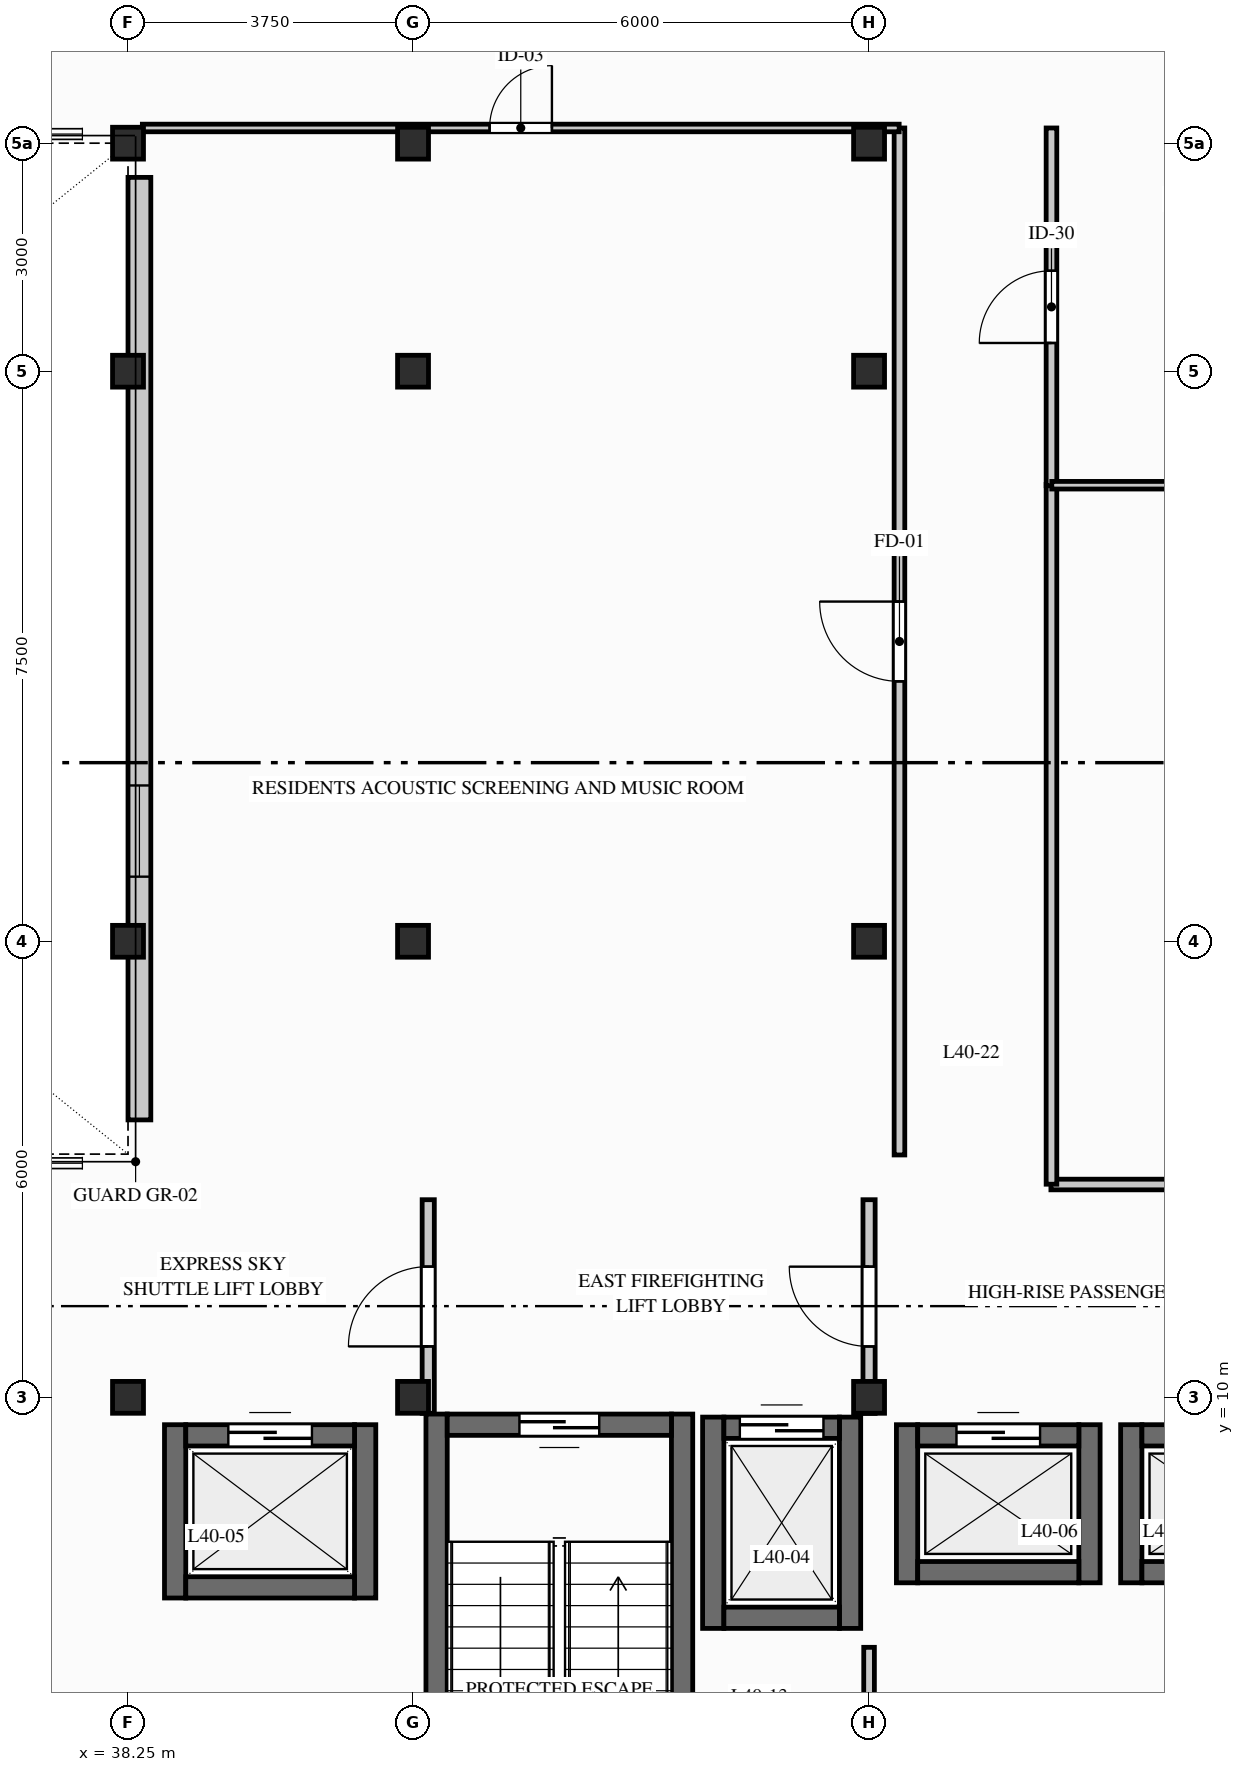
"""IFC4 building model, lengths in metres.
Left out: names, types, materials, properties, quantities, classifications, styles, units other than length and angle.
Written with IfcOpenShell. Run it as: python <this file> out.ifc"""

import sys

from ifc_helpers import new_model, si_unit, direction, frame, frame_2d, origin, origin_2d, place, context, subcontext, project, spatial, rectangle, i_section, extrude, element, fill, save


model = new_model("IFC4")
c1 = context("Model", 3, precision=1e-05, world=origin(), true_north=direction((0.0, 1.0)))
c2 = subcontext(c1, "Body", "Model", "MODEL_VIEW")
j1 = project(units=[si_unit("LENGTHUNIT", "METRE"), si_unit("PLANEANGLEUNIT", "RADIAN")], contexts=[c1])
p1 = place(None, origin())
s1 = spatial("IfcSite", under=j1, at=p1, CompositionType="ELEMENT")
p2 = place(p1, origin())
s2 = spatial("IfcBuilding", under=s1, at=p2, CompositionType="ELEMENT")
p3 = place(p2, frame((0.0, 0.0, 134.5)))
s3 = spatial("IfcBuildingStorey", under=s2, at=p3, CompositionType="ELEMENT", Elevation=134.5)
for number, where, z_axis, x_axis in (
    (1, (38.25, 10.0, 0.0), (0.0, 0.0, 1.0), (1.0, 0.0, 0.0)),
    (2, (38.25, 16.0, 0.0), (0.0, 0.0, 1.0), (1.0, 0.0, 0.0)),
    (3, (38.25, 23.5, 0.0), (0.0, 0.0, 1.0), (1.0, 0.0, 0.0)),
    (4, (38.25, 26.5, 0.0), (0.0, 0.0, 1.0), (1.0, 0.0, 0.0)),
    (5, (42.0, 10.0, 0.0), (0.0, 0.0, 1.0), (1.0, 0.0, 0.0)),
    (6, (42.0, 16.0, 0.0), (0.0, 0.0, 1.0), (1.0, 0.0, 0.0)),
    (7, (42.0, 23.5, 0.0), (0.0, 0.0, 1.0), (1.0, 0.0, 0.0)),
    (8, (42.0, 26.5, 0.0), (0.0, 0.0, 1.0), (1.0, 0.0, 0.0)),
    (9, (48.0, 10.0, 0.0), (0.0, 0.0, 1.0), (1.0, 0.0, 0.0)),
    (10, (48.0, 16.0, 0.0), (0.0, 0.0, 1.0), (1.0, 0.0, 0.0)),
    (11, (48.0, 23.5, 0.0), (0.0, 0.0, 1.0), (1.0, 0.0, 0.0)),
    (12, (48.0, 26.5, 0.0), (0.0, 0.0, 1.0), (1.0, 0.0, 0.0)),
):
    element("IfcColumn", number, at=place(p3, frame(where, z_axis=z_axis, x_axis=x_axis)), inside=s3, PredefinedType="COLUMN", context=c2, shape_type="SweptSolid", body=[
        extrude(i_section(OverallWidth=0.407, OverallDepth=0.419, WebThickness=0.031, FlangeThickness=0.049, FilletRadius=0.015, at=origin_2d()), origin(), (0.0, 0.0, 1.0), 4.2),
    ])
p4 = place(p3, frame((38.4, 13.65, 0.0), z_axis=(0.0, 0.0, 1.0), x_axis=(0.0, 1.0, 0.0)))
e13 = element("IfcWall", 13, at=p4, inside=s3, PredefinedType="STANDARD", context=c2, shape_type="SweptSolid", body=[
    extrude(rectangle(XDim=12.4, YDim=0.3, at=frame_2d((6.2, 0.0))), origin(), (0.0, 0.0, 1.0), 3.343),
])
p5 = place(p4, frame((3.2, 0.0, 0.5)))
e14 = element("IfcOpeningElement", 14, at=p5, cuts=e13, PredefinedType="OPENING", context=c2, shape_type="SweptSolid", body=[
    extrude(rectangle(XDim=1.2, YDim=1.6, at=frame_2d((0.6, 0.8))), frame((0.0, 0.16, 0.0), z_axis=(0.0, -1.0, 0.0), x_axis=(1.0, 0.0, 0.0)), (0.0, 0.0, 1.0), 0.32),
])
for number, where, z_axis, x_axis in (
    (15, (42.31, 2.5, 0.0), (0.0, 0.0, 1.0), (0.0, 1.0, 0.0)),
    (16, (45.54, 2.5, 0.0), (0.0, 0.0, 1.0), (0.0, 1.0, 0.0)),
):
    element("IfcWall", number, at=place(p3, frame(where, z_axis=z_axis, x_axis=x_axis)), inside=s3, PredefinedType="SHEAR", context=c2, shape_type="SweptSolid", body=[
        extrude(rectangle(XDim=7.28, YDim=0.28, at=frame_2d((3.64, 0.0))), origin(), (0.0, 0.0, 1.0), 3.98),
    ])
p6 = place(p3, frame((45.4, 9.64, 0.0), z_axis=(0.0, 0.0, 1.0), x_axis=(-1.0, 0.0, 0.0)))
e17 = element("IfcWall", 17, at=p6, inside=s3, PredefinedType="SHEAR", context=c2, shape_type="SweptSolid", body=[
    extrude(rectangle(XDim=2.95, YDim=0.28, at=frame_2d((1.475, 0.0))), origin(), (0.0, 0.0, 1.0), 3.98),
])
p7 = place(p6, frame((0.95, 0.0, 0.0)))
e18 = element("IfcOpeningElement", 18, at=p7, cuts=e17, PredefinedType="OPENING", context=c2, shape_type="SweptSolid", body=[
    extrude(rectangle(XDim=1.05, YDim=2.06, at=frame_2d((0.525, 1.03))), frame((0.0, 0.15, 0.0), z_axis=(0.0, -1.0, 0.0), x_axis=(1.0, 0.0, 0.0)), (0.0, 0.0, 1.0), 0.3),
])
for number, where, z_axis, x_axis in (
    (19, (45.95, 6.96, 0.0), (0.0, 0.0, 1.0), (0.0, 1.0, 0.0)),
    (20, (47.75, 6.96, 0.0), (0.0, 0.0, 1.0), (0.0, 1.0, 0.0)),
):
    element("IfcWall", number, at=place(p3, frame(where, z_axis=z_axis, x_axis=x_axis)), inside=s3, PredefinedType="SHEAR", context=c2, shape_type="SweptSolid", body=[
        extrude(rectangle(XDim=2.78, YDim=0.28, at=frame_2d((1.39, 0.0))), origin(), (0.0, 0.0, 1.0), 3.98),
    ])
p8 = place(p3, frame((46.09, 7.1, 0.0), z_axis=(0.0, 0.0, 1.0), x_axis=(1.0, 0.0, 0.0)))
e21 = element("IfcWall", 21, at=p8, inside=s3, PredefinedType="SHEAR", context=c2, shape_type="SweptSolid", body=[
    extrude(rectangle(XDim=1.52, YDim=0.28, at=frame_2d((0.76, 0.0))), origin(), (0.0, 0.0, 1.0), 3.98),
])
p9 = place(p3, frame((46.09, 9.6, 0.0), z_axis=(0.0, 0.0, 1.0), x_axis=(1.0, 0.0, 0.0)))
e22 = element("IfcWall", 22, at=p9, inside=s3, PredefinedType="SHEAR", context=c2, shape_type="SweptSolid", body=[
    extrude(rectangle(XDim=1.52, YDim=0.28, at=frame_2d((0.76, 0.0))), origin(), (0.0, 0.0, 1.0), 3.98),
])
p10 = place(p9, frame((0.21, 0.0, 0.0)))
e23 = element("IfcOpeningElement", 23, at=p10, cuts=e22, PredefinedType="OPENING", context=c2, shape_type="SweptSolid", body=[
    extrude(rectangle(XDim=1.1, YDim=2.06, at=frame_2d((0.55, 1.03))), frame((0.0, 0.15, 0.0), z_axis=(0.0, -1.0, 0.0), x_axis=(1.0, 0.0, 0.0)), (0.0, 0.0, 1.0), 0.3),
])
for number, where, z_axis, x_axis in (
    (24, (38.87, 7.36, 0.0), (0.0, 0.0, 1.0), (0.0, 1.0, 0.0)),
    (25, (41.37, 7.36, 0.0), (0.0, 0.0, 1.0), (0.0, 1.0, 0.0)),
):
    element("IfcWall", number, at=place(p3, frame(where, z_axis=z_axis, x_axis=x_axis)), inside=s3, PredefinedType="SHEAR", context=c2, shape_type="SweptSolid", body=[
        extrude(rectangle(XDim=2.28, YDim=0.28, at=frame_2d((1.14, 0.0))), origin(), (0.0, 0.0, 1.0), 3.98),
    ])
p11 = place(p3, frame((39.01, 7.5, 0.0), z_axis=(0.0, 0.0, 1.0), x_axis=(1.0, 0.0, 0.0)))
e26 = element("IfcWall", 26, at=p11, inside=s3, PredefinedType="SHEAR", context=c2, shape_type="SweptSolid", body=[
    extrude(rectangle(XDim=2.22, YDim=0.28, at=frame_2d((1.11, 0.0))), origin(), (0.0, 0.0, 1.0), 3.98),
])
p12 = place(p3, frame((39.01, 9.5, 0.0), z_axis=(0.0, 0.0, 1.0), x_axis=(1.0, 0.0, 0.0)))
e27 = element("IfcWall", 27, at=p12, inside=s3, PredefinedType="SHEAR", context=c2, shape_type="SweptSolid", body=[
    extrude(rectangle(XDim=2.22, YDim=0.28, at=frame_2d((1.11, 0.0))), origin(), (0.0, 0.0, 1.0), 3.98),
])
p13 = place(p12, frame((0.56, 0.0, 0.0)))
e28 = element("IfcOpeningElement", 28, at=p13, cuts=e27, PredefinedType="OPENING", context=c2, shape_type="SweptSolid", body=[
    extrude(rectangle(XDim=1.1, YDim=2.06, at=frame_2d((0.55, 1.03))), frame((0.0, 0.15, 0.0), z_axis=(0.0, -1.0, 0.0), x_axis=(1.0, 0.0, 0.0)), (0.0, 0.0, 1.0), 0.3),
])
for number, where, z_axis, x_axis in (
    (29, (48.5, 7.56, 0.0), (0.0, 0.0, 1.0), (0.0, 1.0, 0.0)),
    (30, (50.9, 7.56, 0.0), (0.0, 0.0, 1.0), (0.0, 1.0, 0.0)),
):
    element("IfcWall", number, at=place(p3, frame(where, z_axis=z_axis, x_axis=x_axis)), inside=s3, PredefinedType="SHEAR", context=c2, shape_type="SweptSolid", body=[
        extrude(rectangle(XDim=2.08, YDim=0.28, at=frame_2d((1.04, 0.0))), origin(), (0.0, 0.0, 1.0), 3.98),
    ])
p14 = place(p3, frame((48.64, 7.7, 0.0), z_axis=(0.0, 0.0, 1.0), x_axis=(1.0, 0.0, 0.0)))
e31 = element("IfcWall", 31, at=p14, inside=s3, PredefinedType="SHEAR", context=c2, shape_type="SweptSolid", body=[
    extrude(rectangle(XDim=2.12, YDim=0.28, at=frame_2d((1.06, 0.0))), origin(), (0.0, 0.0, 1.0), 3.98),
])
p15 = place(p3, frame((48.64, 9.5, 0.0), z_axis=(0.0, 0.0, 1.0), x_axis=(1.0, 0.0, 0.0)))
e32 = element("IfcWall", 32, at=p15, inside=s3, PredefinedType="SHEAR", context=c2, shape_type="SweptSolid", body=[
    extrude(rectangle(XDim=2.12, YDim=0.28, at=frame_2d((1.06, 0.0))), origin(), (0.0, 0.0, 1.0), 3.98),
])
p16 = place(p15, frame((0.51, 0.0, 0.0)))
e33 = element("IfcOpeningElement", 33, at=p16, cuts=e32, PredefinedType="OPENING", context=c2, shape_type="SweptSolid", body=[
    extrude(rectangle(XDim=1.1, YDim=2.06, at=frame_2d((0.55, 1.03))), frame((0.0, 0.15, 0.0), z_axis=(0.0, -1.0, 0.0), x_axis=(1.0, 0.0, 0.0)), (0.0, 0.0, 1.0), 0.3),
])
p17 = place(p3, frame((51.45, 7.56, 0.0), z_axis=(0.0, 0.0, 1.0), x_axis=(0.0, 1.0, 0.0)))
e34 = element("IfcWall", 34, at=p17, inside=s3, PredefinedType="SHEAR", context=c2, shape_type="SweptSolid", body=[
    extrude(rectangle(XDim=2.08, YDim=0.28, at=frame_2d((1.04, 0.0))), origin(), (0.0, 0.0, 1.0), 3.98),
])
p18 = place(p3, frame((51.59, 7.7, 0.0), z_axis=(0.0, 0.0, 1.0), x_axis=(1.0, 0.0, 0.0)))
e35 = element("IfcWall", 35, at=p18, inside=s3, PredefinedType="SHEAR", context=c2, shape_type="SweptSolid", body=[
    extrude(rectangle(XDim=2.12, YDim=0.28, at=frame_2d((1.06, 0.0))), origin(), (0.0, 0.0, 1.0), 3.98),
])
p19 = place(p3, frame((51.59, 9.5, 0.0), z_axis=(0.0, 0.0, 1.0), x_axis=(1.0, 0.0, 0.0)))
e36 = element("IfcWall", 36, at=p19, inside=s3, PredefinedType="SHEAR", context=c2, shape_type="SweptSolid", body=[
    extrude(rectangle(XDim=2.12, YDim=0.28, at=frame_2d((1.06, 0.0))), origin(), (0.0, 0.0, 1.0), 3.98),
])
p20 = place(p19, frame((0.51, 0.0, 0.0)))
e37 = element("IfcOpeningElement", 37, at=p20, cuts=e36, PredefinedType="OPENING", context=c2, shape_type="SweptSolid", body=[
    extrude(rectangle(XDim=1.1, YDim=2.06, at=frame_2d((0.55, 1.03))), frame((0.0, 0.15, 0.0), z_axis=(0.0, -1.0, 0.0), x_axis=(1.0, 0.0, 0.0)), (0.0, 0.0, 1.0), 0.3),
])
p21 = place(p3, frame((48.0, 3.15, 0.0), z_axis=(0.0, 0.0, 1.0), x_axis=(0.0, 1.0, 0.0)))
e38 = element("IfcWall", 38, at=p21, inside=s3, PredefinedType="PARTITIONING", context=c2, shape_type="SweptSolid", body=[
    extrude(rectangle(XDim=3.561, YDim=0.14, at=frame_2d((1.781, 0.0))), origin(), (0.0, 0.0, 1.0), 3.343),
])
p22 = place(p21, frame((1.371, 0.0, 0.0)))
e39 = element("IfcOpeningElement", 39, at=p22, cuts=e38, PredefinedType="OPENING", context=c2, shape_type="SweptSolid", body=[
    extrude(rectangle(XDim=0.82, YDim=2.02, at=frame_2d((0.41, 1.01))), frame((0.0, 0.08, 0.0), z_axis=(0.0, -1.0, 0.0), x_axis=(1.0, 0.0, 0.0)), (0.0, 0.0, 1.0), 0.16),
])
p23 = place(p3, frame((42.2, 9.79, 0.0), z_axis=(0.0, 0.0, 1.0), x_axis=(0.0, 1.0, 0.0)))
e40 = element("IfcWall", 40, at=p23, inside=s3, PredefinedType="PARTITIONING", context=c2, shape_type="SweptSolid", body=[
    extrude(rectangle(XDim=2.81, YDim=0.16, at=frame_2d((1.405, 0.0))), origin(), (0.0, 0.0, 1.0), 3.343),
])
p24 = place(p23, frame((0.88, 0.0, 0.0)))
e41 = element("IfcOpeningElement", 41, at=p24, cuts=e40, PredefinedType="OPENING", context=c2, shape_type="SweptSolid", body=[
    extrude(rectangle(XDim=1.05, YDim=2.06, at=frame_2d((0.525, 1.03))), frame((0.0, 0.09, 0.0), z_axis=(0.0, -1.0, 0.0), x_axis=(1.0, 0.0, 0.0)), (0.0, 0.0, 1.0), 0.18),
])
p25 = place(p3, frame((48.0, 9.789, 0.0), z_axis=(0.0, 0.0, 1.0), x_axis=(0.0, 1.0, 0.0)))
e42 = element("IfcWall", 42, at=p25, inside=s3, PredefinedType="PARTITIONING", context=c2, shape_type="SweptSolid", body=[
    extrude(rectangle(XDim=2.811, YDim=0.16, at=frame_2d((1.406, 0.0))), origin(), (0.0, 0.0, 1.0), 3.343),
])
p26 = place(p25, frame((0.881, 0.0, 0.0)))
e43 = element("IfcOpeningElement", 43, at=p26, cuts=e42, PredefinedType="OPENING", context=c2, shape_type="SweptSolid", body=[
    extrude(rectangle(XDim=1.05, YDim=2.06, at=frame_2d((0.525, 1.03))), frame((0.0, 0.09, 0.0), z_axis=(0.0, -1.0, 0.0), x_axis=(1.0, 0.0, 0.0)), (0.0, 0.0, 1.0), 0.18),
])
p27 = place(p3, frame((50.393, 12.8, 0.0), z_axis=(0.0, 0.0, 1.0), x_axis=(1.0, 0.0, 0.0)))
e44 = element("IfcWall", 44, at=p27, inside=s3, PredefinedType="PARTITIONING", context=c2, shape_type="SweptSolid", body=[
    extrude(rectangle(XDim=6.753, YDim=0.14, at=frame_2d((3.377, 0.0))), origin(), (0.0, 0.0, 1.0), 3.343),
])
p28 = place(p27, frame((2.902, 0.0, 0.0)))
e45 = element("IfcOpeningElement", 45, at=p28, cuts=e44, PredefinedType="OPENING", context=c2, shape_type="SweptSolid", body=[
    extrude(rectangle(XDim=0.95, YDim=2.05, at=frame_2d((0.475, 1.025))), frame((0.0, 0.08, 0.0), z_axis=(0.0, -1.0, 0.0), x_axis=(1.0, 0.0, 0.0)), (0.0, 0.0, 1.0), 0.16),
])
p29 = place(p3, frame((48.4, 13.189, 0.0), z_axis=(0.0, 0.0, 1.0), x_axis=(0.0, 1.0, 0.0)))
e46 = element("IfcWall", 46, at=p29, inside=s3, PredefinedType="PARTITIONING", context=c2, shape_type="SweptSolid", body=[
    extrude(rectangle(XDim=13.511, YDim=0.14, at=frame_2d((6.756, 0.0))), origin(), (0.0, 0.0, 1.0), 3.343),
])
p30 = place(p29, frame((6.231, 0.0, 0.0)))
e47 = element("IfcOpeningElement", 47, at=p30, cuts=e46, PredefinedType="OPENING", context=c2, shape_type="SweptSolid", body=[
    extrude(rectangle(XDim=1.05, YDim=2.06, at=frame_2d((0.525, 1.03))), frame((0.0, 0.08, 0.0), z_axis=(0.0, -1.0, 0.0), x_axis=(1.0, 0.0, 0.0)), (0.0, 0.0, 1.0), 0.16),
])
p31 = place(p3, frame((50.4, 12.804, 0.0), z_axis=(0.0, 0.0, 1.0), x_axis=(0.0, 1.0, 0.0)))
e48 = element("IfcWall", 48, at=p31, inside=s3, PredefinedType="PARTITIONING", context=c2, shape_type="SweptSolid", body=[
    extrude(rectangle(XDim=9.207, YDim=0.14, at=frame_2d((4.604, 0.0))), origin(), (0.0, 0.0, 1.0), 3.343),
])
p32 = place(p3, frame((50.4, 21.993, 0.0), z_axis=(0.0, 0.0, 1.0), x_axis=(0.0, 1.0, 0.0)))
e49 = element("IfcWall", 49, at=p32, inside=s3, PredefinedType="PARTITIONING", context=c2, shape_type="SweptSolid", body=[
    extrude(rectangle(XDim=4.707, YDim=0.14, at=frame_2d((2.354, 0.0))), origin(), (0.0, 0.0, 1.0), 3.343),
])
p33 = place(p32, frame((1.879, 0.0, 0.0)))
e50 = element("IfcOpeningElement", 50, at=p33, cuts=e49, PredefinedType="OPENING", context=c2, shape_type="SweptSolid", body=[
    extrude(rectangle(XDim=0.95, YDim=2.05, at=frame_2d((0.475, 1.025))), frame((0.0, 0.08, 0.0), z_axis=(0.0, -1.0, 0.0), x_axis=(1.0, 0.0, 0.0)), (0.0, 0.0, 1.0), 0.16),
])
p34 = place(p3, frame((38.439, 26.7, 0.0), z_axis=(0.0, 0.0, 1.0), x_axis=(1.0, 0.0, 0.0)))
e51 = element("IfcWall", 51, at=p34, inside=s3, PredefinedType="PARTITIONING", context=c2, shape_type="SweptSolid", body=[
    extrude(rectangle(XDim=9.957, YDim=0.1, at=frame_2d((4.979, 0.0))), origin(), (0.0, 0.0, 1.0), 3.343),
])
p35 = place(p34, frame((4.569, 0.0, 0.0)))
e52 = element("IfcOpeningElement", 52, at=p35, cuts=e51, PredefinedType="OPENING", context=c2, shape_type="SweptSolid", body=[
    extrude(rectangle(XDim=0.82, YDim=2.02, at=frame_2d((0.41, 1.01))), frame((0.0, 0.06, 0.0), z_axis=(0.0, -1.0, 0.0), x_axis=(1.0, 0.0, 0.0)), (0.0, 0.0, 1.0), 0.12),
])
p36 = place(p3, frame((50.404, 22.0, 0.0), z_axis=(0.0, 0.0, 1.0), x_axis=(1.0, 0.0, 0.0)))
e53 = element("IfcWall", 53, at=p36, inside=s3, PredefinedType="PARTITIONING", context=c2, shape_type="SweptSolid", body=[
    extrude(rectangle(XDim=9.396, YDim=0.1, at=frame_2d((4.698, 0.0))), origin(), (0.0, 0.0, 1.0), 3.343),
])
p37 = place(p5, origin())
e54 = element("IfcWindow", 54, at=p37, inside=s3, PartitioningType="SINGLE_PANEL", PredefinedType="WINDOW", context=c2, shape_type="SweptSolid", body=[
    extrude(rectangle(XDim=1.2, YDim=1.6, at=frame_2d((0.6, 0.8))), frame((0.0, 0.03, 0.0), z_axis=(0.0, -1.0, 0.0), x_axis=(1.0, 0.0, 0.0)), (0.0, 0.0, 1.0), 0.06),
])
fill(e14, e54)
p38 = place(p7, origin())
e55 = element("IfcDoor", 55, at=p38, inside=s3, OperationType="SINGLE_SWING_LEFT", PredefinedType="DOOR", context=c2, shape_type="SweptSolid", body=[
    extrude(rectangle(XDim=1.05, YDim=2.06, at=frame_2d((0.525, 1.03))), frame((0.0, 0.025, 0.0), z_axis=(0.0, -1.0, 0.0), x_axis=(1.0, 0.0, 0.0)), (0.0, 0.0, 1.0), 0.05),
])
fill(e18, e55)
p39 = place(p10, origin())
e56 = element("IfcDoor", 56, at=p39, inside=s3, OperationType="SLIDING_TO_LEFT", PredefinedType="DOOR", context=c2, shape_type="SweptSolid", body=[
    extrude(rectangle(XDim=1.1, YDim=2.06, at=frame_2d((0.55, 1.03))), frame((0.0, 0.025, 0.0), z_axis=(0.0, -1.0, 0.0), x_axis=(1.0, 0.0, 0.0)), (0.0, 0.0, 1.0), 0.05),
])
fill(e23, e56)
p40 = place(p13, origin())
e57 = element("IfcDoor", 57, at=p40, inside=s3, OperationType="SLIDING_TO_RIGHT", PredefinedType="DOOR", context=c2, shape_type="SweptSolid", body=[
    extrude(rectangle(XDim=1.1, YDim=2.06, at=frame_2d((0.55, 1.03))), frame((0.0, 0.025, 0.0), z_axis=(0.0, -1.0, 0.0), x_axis=(1.0, 0.0, 0.0)), (0.0, 0.0, 1.0), 0.05),
])
fill(e28, e57)
p41 = place(p16, origin())
e58 = element("IfcDoor", 58, at=p41, inside=s3, OperationType="SLIDING_TO_LEFT", PredefinedType="DOOR", context=c2, shape_type="SweptSolid", body=[
    extrude(rectangle(XDim=1.1, YDim=2.06, at=frame_2d((0.55, 1.03))), frame((0.0, 0.025, 0.0), z_axis=(0.0, -1.0, 0.0), x_axis=(1.0, 0.0, 0.0)), (0.0, 0.0, 1.0), 0.05),
])
fill(e33, e58)
p42 = place(p24, origin())
e59 = element("IfcDoor", 59, at=p42, inside=s3, OperationType="SINGLE_SWING_LEFT", PredefinedType="DOOR", context=c2, shape_type="SweptSolid", body=[
    extrude(rectangle(XDim=1.05, YDim=2.06, at=frame_2d((0.525, 1.03))), frame((0.0, 0.025, 0.0), z_axis=(0.0, -1.0, 0.0), x_axis=(1.0, 0.0, 0.0)), (0.0, 0.0, 1.0), 0.05),
])
fill(e41, e59)
p43 = place(p26, origin())
e60 = element("IfcDoor", 60, at=p43, inside=s3, OperationType="SINGLE_SWING_RIGHT", PredefinedType="DOOR", context=c2, shape_type="SweptSolid", body=[
    extrude(rectangle(XDim=1.05, YDim=2.06, at=frame_2d((0.525, 1.03))), frame((0.0, 0.025, 0.0), z_axis=(0.0, -1.0, 0.0), x_axis=(1.0, 0.0, 0.0)), (0.0, 0.0, 1.0), 0.05),
])
fill(e43, e60)
p44 = place(p30, origin())
e61 = element("IfcDoor", 61, at=p44, inside=s3, OperationType="SINGLE_SWING_RIGHT", PredefinedType="DOOR", context=c2, shape_type="SweptSolid", body=[
    extrude(rectangle(XDim=1.05, YDim=2.06, at=frame_2d((0.525, 1.03))), frame((0.0, 0.025, 0.0), z_axis=(0.0, -1.0, 0.0), x_axis=(1.0, 0.0, 0.0)), (0.0, 0.0, 1.0), 0.05),
])
fill(e47, e61)
p45 = place(p33, origin())
e62 = element("IfcDoor", 62, at=p45, inside=s3, OperationType="SINGLE_SWING_LEFT", PredefinedType="DOOR", context=c2, shape_type="SweptSolid", body=[
    extrude(rectangle(XDim=0.95, YDim=2.05, at=frame_2d((0.475, 1.025))), frame((0.0, 0.025, 0.0), z_axis=(0.0, -1.0, 0.0), x_axis=(1.0, 0.0, 0.0)), (0.0, 0.0, 1.0), 0.05),
])
fill(e50, e62)
p46 = place(p35, origin())
e63 = element("IfcDoor", 63, at=p46, inside=s3, OperationType="SINGLE_SWING_RIGHT", PredefinedType="DOOR", context=c2, shape_type="SweptSolid", body=[
    extrude(rectangle(XDim=0.82, YDim=2.02, at=frame_2d((0.41, 1.01))), frame((0.0, 0.025, 0.0), z_axis=(0.0, -1.0, 0.0), x_axis=(1.0, 0.0, 0.0)), (0.0, 0.0, 1.0), 0.05),
])
fill(e52, e63)
save(model, sys.argv[1])
